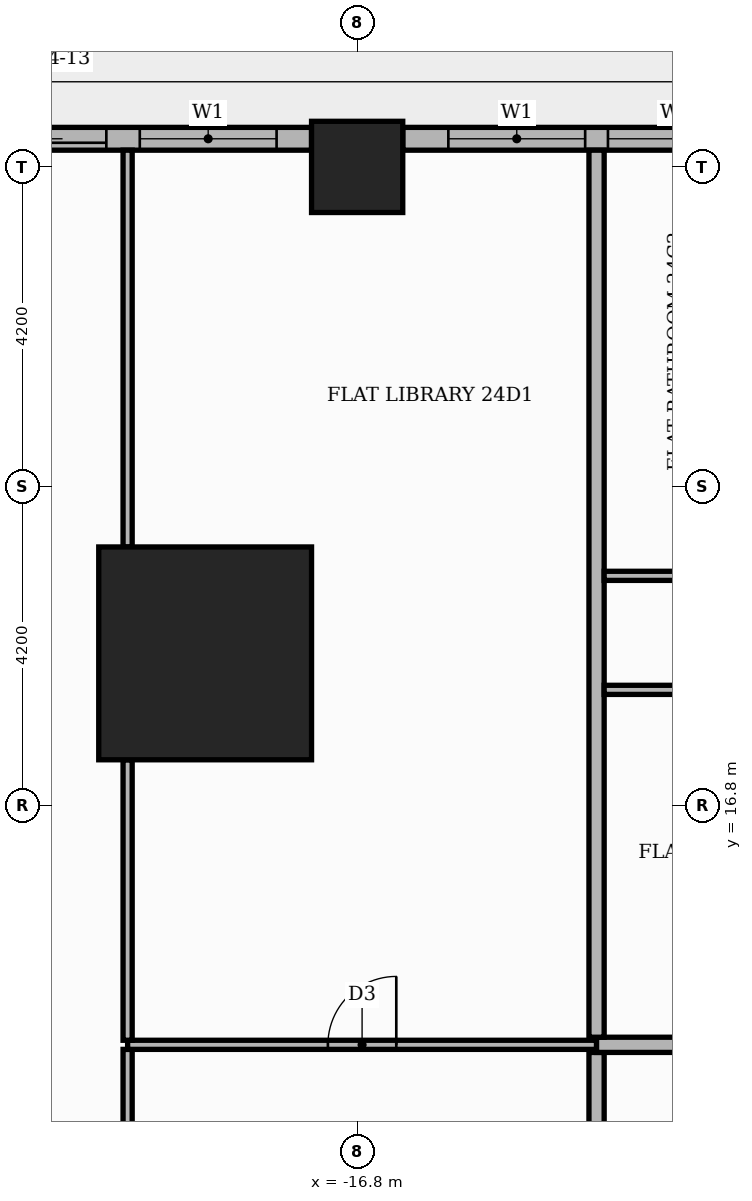
"""IFC4 building model, lengths in metres.
Left out: names, types, materials, properties, quantities, classifications, styles, units other than length and angle.
Written with IfcOpenShell. Run it as: python <this file> out.ifc"""

import sys

from ifc_helpers import new_model, si_unit, direction, frame, frame_2d, origin, origin_2d, place, context, subcontext, project, spatial, rectangle, extrude, element, fill, save


model = new_model("IFC4")
c1 = context("Model", 3, precision=1e-05, world=origin(), true_north=direction((0.0, 1.0)))
c2 = subcontext(c1, "Body", "Model", "MODEL_VIEW")
j1 = project(units=[si_unit("LENGTHUNIT", "METRE"), si_unit("PLANEANGLEUNIT", "RADIAN")], contexts=[c1])
p1 = place(None, origin())
s1 = spatial("IfcSite", under=j1, at=p1, CompositionType="ELEMENT")
p2 = place(p1, origin())
s2 = spatial("IfcBuilding", under=s1, at=p2, CompositionType="ELEMENT")
p3 = place(p2, frame((0.0, 0.0, 102.6)))
s3 = spatial("IfcBuildingStorey", under=s2, at=p3, CompositionType="ELEMENT", Elevation=102.6)
p4 = place(p3, frame((-18.8, 18.8, 0.0), z_axis=(0.0, 0.0, 1.0), x_axis=(1.0, 0.0, 0.0)))
e1 = element("IfcColumn", 1, at=p4, inside=s3, PredefinedType="COLUMN", context=c2, shape_type="SweptSolid", body=[
    extrude(rectangle(XDim=2.8, YDim=2.8, at=origin_2d()), origin(), (0.0, 0.0, 1.0), 3.9),
])
p5 = place(p3, frame((-16.8, 25.2, 0.0), z_axis=(0.0, 0.0, 1.0), x_axis=(1.0, 0.0, 0.0)))
e2 = element("IfcColumn", 2, at=p5, inside=s3, PredefinedType="COLUMN", context=c2, shape_type="SweptSolid", body=[
    extrude(rectangle(XDim=1.2, YDim=1.2, at=origin_2d()), origin(), (0.0, 0.0, 1.0), 3.9),
])
p6 = place(p3, frame((-9.0, 25.57, 0.0), z_axis=(0.0, 0.0, 1.0), x_axis=(-1.0, 0.0, 0.0)))
e3 = element("IfcWall", 3, at=p6, inside=s3, PredefinedType="STANDARD", context=c2, shape_type="SweptSolid", body=[
    extrude(rectangle(XDim=7.2, YDim=0.3, at=frame_2d((3.6, 0.0))), origin(), (0.0, 0.0, 1.0), 3.48),
])
p7 = place(p6, frame((0.6, 0.0, 0.9)))
e4 = element("IfcOpeningElement", 4, at=p7, cuts=e3, PredefinedType="OPENING", context=c2, shape_type="SweptSolid", body=[
    extrude(rectangle(XDim=1.8, YDim=2.1, at=frame_2d((0.9, 1.05))), frame((0.0, 0.16, 0.0), z_axis=(0.0, -1.0, 0.0), x_axis=(1.0, 0.0, 0.0)), (0.0, 0.0, 1.0), 0.32),
])
p8 = place(p6, frame((2.7, 0.0, 0.9)))
e5 = element("IfcOpeningElement", 5, at=p8, cuts=e3, PredefinedType="OPENING", context=c2, shape_type="SweptSolid", body=[
    extrude(rectangle(XDim=1.8, YDim=2.1, at=frame_2d((0.9, 1.05))), frame((0.0, 0.16, 0.0), z_axis=(0.0, -1.0, 0.0), x_axis=(1.0, 0.0, 0.0)), (0.0, 0.0, 1.0), 0.32),
])
p9 = place(p6, frame((4.8, 0.0, 0.9)))
e6 = element("IfcOpeningElement", 6, at=p9, cuts=e3, PredefinedType="OPENING", context=c2, shape_type="SweptSolid", body=[
    extrude(rectangle(XDim=1.8, YDim=2.1, at=frame_2d((0.9, 1.05))), frame((0.0, 0.16, 0.0), z_axis=(0.0, -1.0, 0.0), x_axis=(1.0, 0.0, 0.0)), (0.0, 0.0, 1.0), 0.32),
])
p10 = place(p3, frame((-17.4, 25.57, 0.0), z_axis=(0.0, 0.0, 1.0), x_axis=(-1.0, 0.0, 0.0)))
e7 = element("IfcWall", 7, at=p10, inside=s3, PredefinedType="STANDARD", context=c2, shape_type="SweptSolid", body=[
    extrude(rectangle(XDim=4.82, YDim=0.3, at=frame_2d((2.41, 0.0))), origin(), (0.0, 0.0, 1.0), 3.48),
])
p11 = place(p10, frame((2.7, 0.0, 0.0)))
e8 = element("IfcOpeningElement", 8, at=p11, cuts=e7, PredefinedType="OPENING", context=c2, shape_type="SweptSolid", body=[
    extrude(rectangle(XDim=1.8, YDim=2.4, at=frame_2d((0.9, 1.2))), frame((0.0, 0.16, 0.0), z_axis=(0.0, -1.0, 0.0), x_axis=(1.0, 0.0, 0.0)), (0.0, 0.0, 1.0), 0.32),
])
p12 = place(p10, frame((0.46, 0.0, 0.9)))
e9 = element("IfcOpeningElement", 9, at=p12, cuts=e7, PredefinedType="OPENING", context=c2, shape_type="SweptSolid", body=[
    extrude(rectangle(XDim=1.8, YDim=2.1, at=frame_2d((0.9, 1.05))), frame((0.0, 0.16, 0.0), z_axis=(0.0, -1.0, 0.0), x_axis=(1.0, 0.0, 0.0)), (0.0, 0.0, 1.0), 0.32),
])
p13 = place(p3, frame((-13.65, -13.55, 0.0), z_axis=(0.0, 0.0, 1.0), x_axis=(0.0, 1.0, 0.0)))
e10 = element("IfcWall", 10, at=p13, inside=s3, PredefinedType="PARTITIONING", context=c2, shape_type="SweptSolid", body=[
    extrude(rectangle(XDim=27.1, YDim=0.2, at=frame_2d((13.55, 0.0))), origin(), (0.0, 0.0, 1.0), 3.48),
])
p14 = place(p13, frame((23.5, 0.0, 0.0)))
e11 = element("IfcOpeningElement", 11, at=p14, cuts=e10, PredefinedType="OPENING", context=c2, shape_type="SweptSolid", body=[
    extrude(rectangle(XDim=1.1, YDim=2.4, at=frame_2d((0.55, 1.2))), frame((0.0, 0.11, 0.0), z_axis=(0.0, -1.0, 0.0), x_axis=(1.0, 0.0, 0.0)), (0.0, 0.0, 1.0), 0.22),
])
p15 = place(p3, frame((-19.82, 9.51, 0.0), z_axis=(0.0, 0.0, 1.0), x_axis=(0.0, 1.0, 0.0)))
e12 = element("IfcWall", 12, at=p15, inside=s3, PredefinedType="PARTITIONING", context=c2, shape_type="SweptSolid", body=[
    extrude(rectangle(XDim=4.08, YDim=0.12, at=frame_2d((2.04, 0.0))), origin(), (0.0, 0.0, 1.0), 3.48),
])
p16 = place(p15, frame((1.54, 0.0, 0.0)))
e13 = element("IfcOpeningElement", 13, at=p16, cuts=e12, PredefinedType="OPENING", context=c2, shape_type="SweptSolid", body=[
    extrude(rectangle(XDim=1.0, YDim=2.1, at=frame_2d((0.5, 1.05))), frame((0.0, 0.07, 0.0), z_axis=(0.0, -1.0, 0.0), x_axis=(1.0, 0.0, 0.0)), (0.0, 0.0, 1.0), 0.14),
])
p17 = place(p3, frame((-19.82, 13.65, 0.0), z_axis=(0.0, 0.0, 1.0), x_axis=(1.0, 0.0, 0.0)))
e14 = element("IfcWall", 14, at=p17, inside=s3, PredefinedType="PARTITIONING", context=c2, shape_type="SweptSolid", body=[
    extrude(rectangle(XDim=6.17, YDim=0.12, at=frame_2d((3.085, 0.0))), origin(), (0.0, 0.0, 1.0), 3.48),
])
p18 = place(p17, frame((2.635, 0.0, 0.0)))
e15 = element("IfcOpeningElement", 15, at=p18, cuts=e14, PredefinedType="OPENING", context=c2, shape_type="SweptSolid", body=[
    extrude(rectangle(XDim=0.9, YDim=2.1, at=frame_2d((0.45, 1.05))), frame((0.0, 0.07, 0.0), z_axis=(0.0, -1.0, 0.0), x_axis=(1.0, 0.0, 0.0)), (0.0, 0.0, 1.0), 0.14),
])
p19 = place(p3, frame((-13.65, 13.65, 0.0), z_axis=(0.0, 0.0, 1.0), x_axis=(1.0, 0.0, 0.0)))
e16 = element("IfcWall", 16, at=p19, inside=s3, PredefinedType="PARTITIONING", context=c2, shape_type="SweptSolid", body=[
    extrude(rectangle(XDim=39.07, YDim=0.2, at=frame_2d((19.535, 0.0))), origin(), (0.0, 0.0, 1.0), 3.48),
])
p20 = place(p19, frame((24.65, 0.0, 0.0)))
e17 = element("IfcOpeningElement", 17, at=p20, cuts=e16, PredefinedType="OPENING", context=c2, shape_type="SweptSolid", body=[
    extrude(rectangle(XDim=1.1, YDim=2.4, at=frame_2d((0.55, 1.2))), frame((0.0, 0.11, 0.0), z_axis=(0.0, -1.0, 0.0), x_axis=(1.0, 0.0, 0.0)), (0.0, 0.0, 1.0), 0.22),
])
p21 = place(p19, frame((14.15, 0.0, 0.0)))
e18 = element("IfcOpeningElement", 18, at=p21, cuts=e16, PredefinedType="OPENING", context=c2, shape_type="SweptSolid", body=[
    extrude(rectangle(XDim=1.1, YDim=2.4, at=frame_2d((0.55, 1.2))), frame((0.0, 0.11, 0.0), z_axis=(0.0, -1.0, 0.0), x_axis=(1.0, 0.0, 0.0)), (0.0, 0.0, 1.0), 0.22),
])
p22 = place(p3, frame((-19.82, 13.71, 0.0), z_axis=(0.0, 0.0, 1.0), x_axis=(0.0, 1.0, 0.0)))
e19 = element("IfcWall", 19, at=p22, inside=s3, PredefinedType="PARTITIONING", context=c2, shape_type="SweptSolid", body=[
    extrude(rectangle(XDim=3.69, YDim=0.12, at=frame_2d((1.845, 0.0))), origin(), (0.0, 0.0, 1.0), 3.48),
])
p23 = place(p3, frame((-13.65, 13.75, 0.0), z_axis=(0.0, 0.0, 1.0), x_axis=(0.0, 1.0, 0.0)))
e20 = element("IfcWall", 20, at=p23, inside=s3, PredefinedType="PARTITIONING", context=c2, shape_type="SweptSolid", body=[
    extrude(rectangle(XDim=11.67, YDim=0.2, at=frame_2d((5.835, 0.0))), origin(), (0.0, 0.0, 1.0), 3.48),
])
p24 = place(p3, frame((-13.55, 18.32, 0.0), z_axis=(0.0, 0.0, 1.0), x_axis=(1.0, 0.0, 0.0)))
e21 = element("IfcWall", 21, at=p24, inside=s3, PredefinedType="PARTITIONING", context=c2, shape_type="SweptSolid", body=[
    extrude(rectangle(XDim=12.5, YDim=0.12, at=frame_2d((6.25, 0.0))), origin(), (0.0, 0.0, 1.0), 3.48),
])
p25 = place(p24, frame((9.125, 0.0, 0.0)))
e22 = element("IfcOpeningElement", 22, at=p25, cuts=e21, PredefinedType="OPENING", context=c2, shape_type="SweptSolid", body=[
    extrude(rectangle(XDim=0.9, YDim=2.1, at=frame_2d((0.45, 1.05))), frame((0.0, 0.07, 0.0), z_axis=(0.0, -1.0, 0.0), x_axis=(1.0, 0.0, 0.0)), (0.0, 0.0, 1.0), 0.14),
])
p26 = place(p24, frame((4.775, 0.0, 0.0)))
e23 = element("IfcOpeningElement", 23, at=p26, cuts=e21, PredefinedType="OPENING", context=c2, shape_type="SweptSolid", body=[
    extrude(rectangle(XDim=0.9, YDim=2.1, at=frame_2d((0.45, 1.05))), frame((0.0, 0.07, 0.0), z_axis=(0.0, -1.0, 0.0), x_axis=(1.0, 0.0, 0.0)), (0.0, 0.0, 1.0), 0.14),
])
p27 = place(p24, frame((1.4, 0.0, 0.0)))
e24 = element("IfcOpeningElement", 24, at=p27, cuts=e21, PredefinedType="OPENING", context=c2, shape_type="SweptSolid", body=[
    extrude(rectangle(XDim=0.9, YDim=2.1, at=frame_2d((0.45, 1.05))), frame((0.0, 0.07, 0.0), z_axis=(0.0, -1.0, 0.0), x_axis=(1.0, 0.0, 0.0)), (0.0, 0.0, 1.0), 0.14),
])
p28 = place(p3, frame((-13.55, 19.82, 0.0), z_axis=(0.0, 0.0, 1.0), x_axis=(1.0, 0.0, 0.0)))
e25 = element("IfcWall", 25, at=p28, inside=s3, PredefinedType="PARTITIONING", context=c2, shape_type="SweptSolid", body=[
    extrude(rectangle(XDim=18.7, YDim=0.12, at=frame_2d((9.35, 0.0))), origin(), (0.0, 0.0, 1.0), 3.48),
])
p29 = place(p28, frame((14.1, 0.0, 0.0)))
e26 = element("IfcOpeningElement", 26, at=p29, cuts=e25, PredefinedType="OPENING", context=c2, shape_type="SweptSolid", body=[
    extrude(rectangle(XDim=1.0, YDim=2.1, at=frame_2d((0.5, 1.05))), frame((0.0, 0.07, 0.0), z_axis=(0.0, -1.0, 0.0), x_axis=(1.0, 0.0, 0.0)), (0.0, 0.0, 1.0), 0.14),
])
p30 = place(p28, frame((6.8, 0.0, 0.0)))
e27 = element("IfcOpeningElement", 27, at=p30, cuts=e25, PredefinedType="OPENING", context=c2, shape_type="SweptSolid", body=[
    extrude(rectangle(XDim=0.9, YDim=2.1, at=frame_2d((0.45, 1.05))), frame((0.0, 0.07, 0.0), z_axis=(0.0, -1.0, 0.0), x_axis=(1.0, 0.0, 0.0)), (0.0, 0.0, 1.0), 0.14),
])
p31 = place(p3, frame((-19.82, 20.2, 0.0), z_axis=(0.0, 0.0, 1.0), x_axis=(0.0, 1.0, 0.0)))
e28 = element("IfcWall", 28, at=p31, inside=s3, PredefinedType="PARTITIONING", context=c2, shape_type="SweptSolid", body=[
    extrude(rectangle(XDim=5.22, YDim=0.12, at=frame_2d((2.61, 0.0))), origin(), (0.0, 0.0, 1.0), 3.48),
])
p32 = place(p8, origin())
e29 = element("IfcWindow", 29, at=p32, inside=s3, PartitioningType="SINGLE_PANEL", PredefinedType="WINDOW", context=c2, shape_type="SweptSolid", body=[
    extrude(rectangle(XDim=1.8, YDim=2.1, at=frame_2d((0.9, 1.05))), frame((0.0, 0.03, 0.0), z_axis=(0.0, -1.0, 0.0), x_axis=(1.0, 0.0, 0.0)), (0.0, 0.0, 1.0), 0.06),
])
fill(e5, e29)
p33 = place(p9, origin())
e30 = element("IfcWindow", 30, at=p33, inside=s3, PartitioningType="SINGLE_PANEL", PredefinedType="WINDOW", context=c2, shape_type="SweptSolid", body=[
    extrude(rectangle(XDim=1.8, YDim=2.1, at=frame_2d((0.9, 1.05))), frame((0.0, 0.03, 0.0), z_axis=(0.0, -1.0, 0.0), x_axis=(1.0, 0.0, 0.0)), (0.0, 0.0, 1.0), 0.06),
])
fill(e6, e30)
p34 = place(p11, origin())
e31 = element("IfcDoor", 31, at=p34, inside=s3, OperationType="SLIDING_TO_LEFT", PredefinedType="DOOR", context=c2, shape_type="SweptSolid", body=[
    extrude(rectangle(XDim=1.8, YDim=2.4, at=frame_2d((0.9, 1.2))), frame((0.0, 0.025, 0.0), z_axis=(0.0, -1.0, 0.0), x_axis=(1.0, 0.0, 0.0)), (0.0, 0.0, 1.0), 0.05),
])
fill(e8, e31)
p35 = place(p12, origin())
e32 = element("IfcWindow", 32, at=p35, inside=s3, PartitioningType="SINGLE_PANEL", PredefinedType="WINDOW", context=c2, shape_type="SweptSolid", body=[
    extrude(rectangle(XDim=1.8, YDim=2.1, at=frame_2d((0.9, 1.05))), frame((0.0, 0.03, 0.0), z_axis=(0.0, -1.0, 0.0), x_axis=(1.0, 0.0, 0.0)), (0.0, 0.0, 1.0), 0.06),
])
fill(e9, e32)
p36 = place(p18, origin())
e33 = element("IfcDoor", 33, at=p36, inside=s3, OperationType="SINGLE_SWING_RIGHT", PredefinedType="DOOR", context=c2, shape_type="SweptSolid", body=[
    extrude(rectangle(XDim=0.9, YDim=2.1, at=frame_2d((0.45, 1.05))), frame((0.0, 0.025, 0.0), z_axis=(0.0, -1.0, 0.0), x_axis=(1.0, 0.0, 0.0)), (0.0, 0.0, 1.0), 0.05),
])
fill(e15, e33)
save(model, sys.argv[1])
